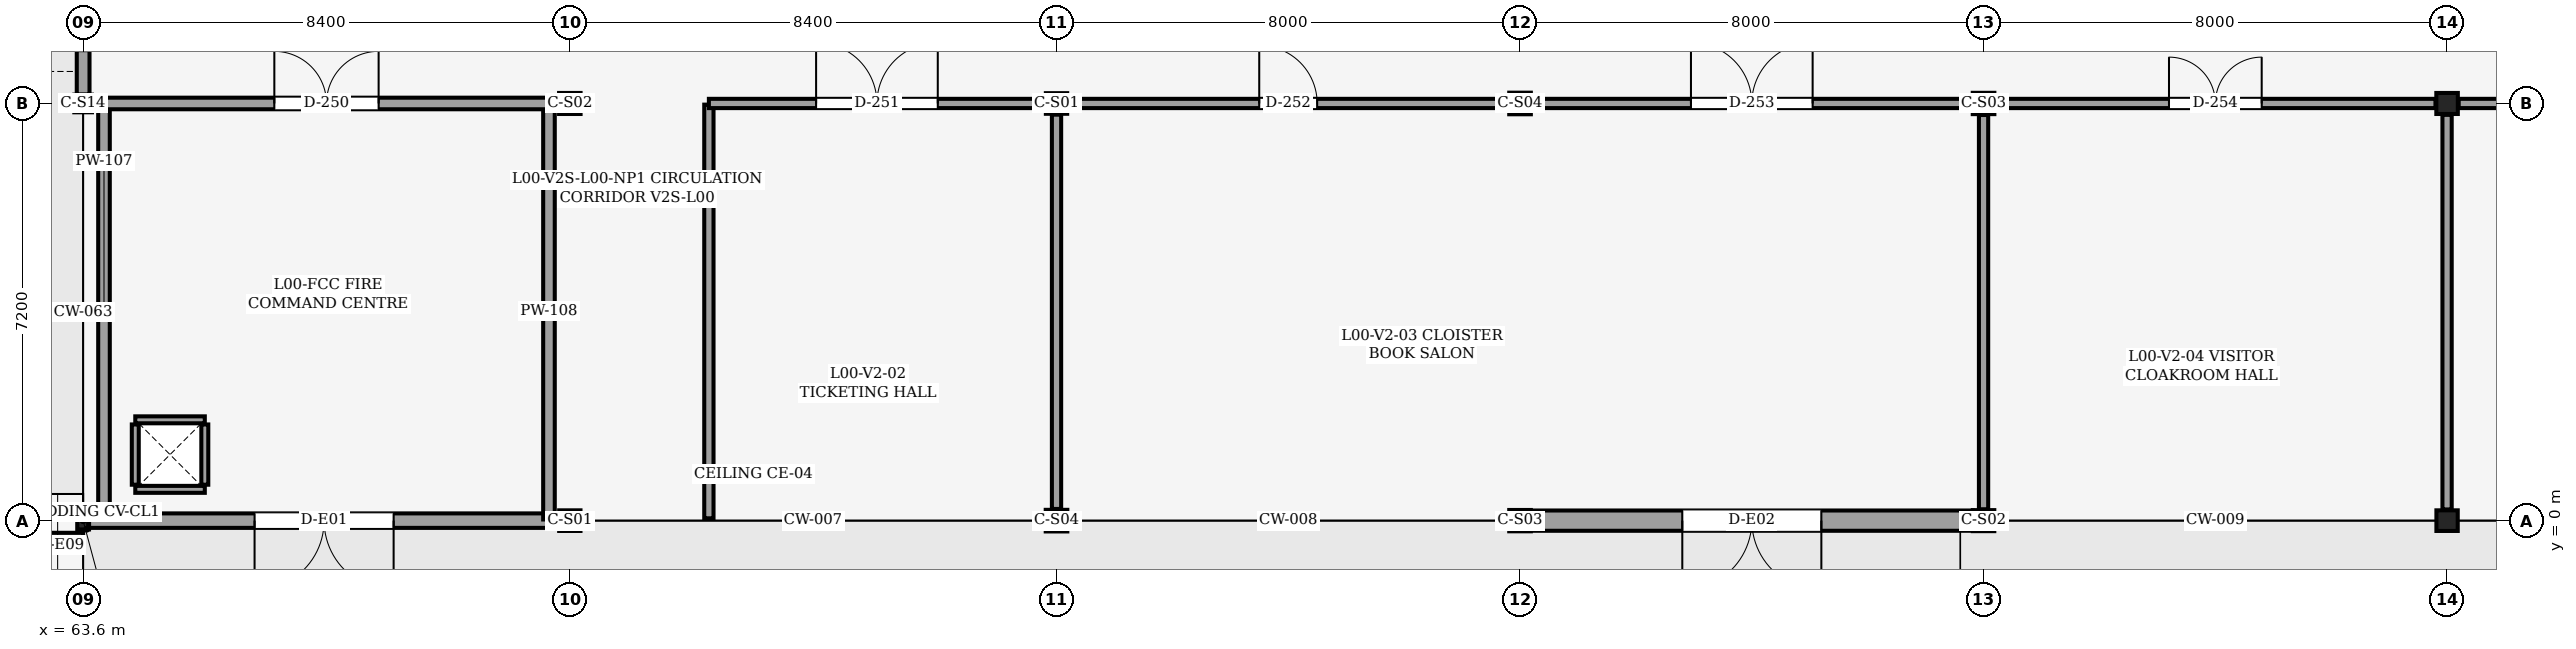
"""IFC4 building model, lengths in metres.
Left out: names, types, materials, properties, quantities, classifications, styles, units other than length and angle.
Written with IfcOpenShell. Run it as: python <this file> out.ifc"""

import sys

from ifc_helpers import new_model, si_unit, direction, frame, frame_2d, origin, origin_2d, place, context, subcontext, project, spatial, rectangle, hollow_rectangle, i_section, extrude, element, fill, save


model = new_model("IFC4")
c1 = context("Model", 3, precision=1e-05, world=origin(), true_north=direction((0.0, 1.0)))
c2 = subcontext(c1, "Body", "Model", "MODEL_VIEW")
j1 = project(units=[si_unit("LENGTHUNIT", "METRE"), si_unit("PLANEANGLEUNIT", "RADIAN")], contexts=[c1])
p1 = place(None, origin())
s1 = spatial("IfcSite", under=j1, at=p1, CompositionType="ELEMENT")
p2 = place(p1, origin())
s2 = spatial("IfcBuilding", under=s1, at=p2, CompositionType="ELEMENT")
p3 = place(p2, origin())
s3 = spatial("IfcBuildingStorey", under=s2, at=p3, CompositionType="ELEMENT", Elevation=0.0)
p4 = place(p3, frame((63.6, 0.0, 0.0), z_axis=(0.0, 0.0, 1.0), x_axis=(1.0, 0.0, 0.0)))
e1 = element("IfcColumn", 1, at=p4, inside=s3, PredefinedType="COLUMN", context=c2, shape_type="SweptSolid", body=[
    extrude(hollow_rectangle(XDim=0.203, YDim=0.305, WallThickness=0.013, OuterFilletRadius=0.025, at=origin_2d()), origin(), (0.0, 0.0, 1.0), 5.4),
])
p5 = place(p3, frame((63.6, 7.2, 0.0), z_axis=(0.0, 0.0, 1.0), x_axis=(1.0, 0.0, 0.0)))
e2 = element("IfcColumn", 2, at=p5, inside=s3, PredefinedType="COLUMN", context=c2, shape_type="SweptSolid", body=[
    extrude(hollow_rectangle(XDim=0.305, YDim=0.305, WallThickness=0.016, OuterFilletRadius=0.032, at=origin_2d()), origin(), (0.0, 0.0, 1.0), 5.4),
])
p6 = place(p3, frame((72.0, 0.0, 0.0), z_axis=(0.0, 0.0, 1.0), x_axis=(1.0, 0.0, 0.0)))
e3 = element("IfcColumn", 3, at=p6, inside=s3, PredefinedType="COLUMN", context=c2, shape_type="SweptSolid", body=[
    extrude(i_section(OverallWidth=0.368, OverallDepth=0.356, WebThickness=0.011, FlangeThickness=0.018, FilletRadius=0.025, at=origin_2d()), origin(), (0.0, 0.0, 1.0), 5.4),
])
p7 = place(p3, frame((72.0, 7.2, 0.0), z_axis=(0.0, 0.0, 1.0), x_axis=(1.0, 0.0, 0.0)))
e4 = element("IfcColumn", 4, at=p7, inside=s3, PredefinedType="COLUMN", context=c2, shape_type="SweptSolid", body=[
    extrude(i_section(OverallWidth=0.371, OverallDepth=0.363, WebThickness=0.013, FlangeThickness=0.022, FilletRadius=0.025, at=origin_2d()), origin(), (0.0, 0.0, 1.0), 5.4),
])
p8 = place(p3, frame((80.4, 0.0, 0.0), z_axis=(0.0, 0.0, 1.0), x_axis=(1.0, 0.0, 0.0)))
e5 = element("IfcColumn", 5, at=p8, inside=s3, PredefinedType="COLUMN", context=c2, shape_type="SweptSolid", body=[
    extrude(i_section(OverallWidth=0.373, OverallDepth=0.373, WebThickness=0.016, FlangeThickness=0.026, FilletRadius=0.025, at=origin_2d()), origin(), (0.0, 0.0, 1.0), 5.4),
])
p9 = place(p3, frame((80.4, 7.2, 0.0), z_axis=(0.0, 0.0, 1.0), x_axis=(1.0, 0.0, 0.0)))
e6 = element("IfcColumn", 6, at=p9, inside=s3, PredefinedType="COLUMN", context=c2, shape_type="SweptSolid", body=[
    extrude(i_section(OverallWidth=0.368, OverallDepth=0.356, WebThickness=0.011, FlangeThickness=0.018, FilletRadius=0.025, at=origin_2d()), origin(), (0.0, 0.0, 1.0), 5.4),
])
p10 = place(p3, frame((88.4, 0.0, 0.0), z_axis=(0.0, 0.0, 1.0), x_axis=(1.0, 0.0, 0.0)))
e7 = element("IfcColumn", 7, at=p10, inside=s3, PredefinedType="COLUMN", context=c2, shape_type="SweptSolid", body=[
    extrude(i_section(OverallWidth=0.373, OverallDepth=0.368, WebThickness=0.015, FlangeThickness=0.024, FilletRadius=0.025, at=origin_2d()), origin(), (0.0, 0.0, 1.0), 5.4),
])
p11 = place(p3, frame((88.4, 7.2, 0.0), z_axis=(0.0, 0.0, 1.0), x_axis=(1.0, 0.0, 0.0)))
e8 = element("IfcColumn", 8, at=p11, inside=s3, PredefinedType="COLUMN", context=c2, shape_type="SweptSolid", body=[
    extrude(i_section(OverallWidth=0.373, OverallDepth=0.373, WebThickness=0.016, FlangeThickness=0.026, FilletRadius=0.025, at=origin_2d()), origin(), (0.0, 0.0, 1.0), 5.4),
])
p12 = place(p3, frame((96.4, 0.0, 0.0), z_axis=(0.0, 0.0, 1.0), x_axis=(1.0, 0.0, 0.0)))
e9 = element("IfcColumn", 9, at=p12, inside=s3, PredefinedType="COLUMN", context=c2, shape_type="SweptSolid", body=[
    extrude(i_section(OverallWidth=0.371, OverallDepth=0.363, WebThickness=0.013, FlangeThickness=0.022, FilletRadius=0.025, at=origin_2d()), origin(), (0.0, 0.0, 1.0), 5.4),
])
p13 = place(p3, frame((96.4, 7.2, 0.0), z_axis=(0.0, 0.0, 1.0), x_axis=(1.0, 0.0, 0.0)))
e10 = element("IfcColumn", 10, at=p13, inside=s3, PredefinedType="COLUMN", context=c2, shape_type="SweptSolid", body=[
    extrude(i_section(OverallWidth=0.373, OverallDepth=0.368, WebThickness=0.015, FlangeThickness=0.024, FilletRadius=0.025, at=origin_2d()), origin(), (0.0, 0.0, 1.0), 5.4),
])
p14 = place(p3, frame((104.4, 0.0, 0.0), z_axis=(0.0, 0.0, 1.0), x_axis=(1.0, 0.0, 0.0)))
e11 = element("IfcColumn", 11, at=p14, inside=s3, PredefinedType="COLUMN", context=c2, shape_type="SweptSolid", body=[
    extrude(i_section(OverallWidth=0.368, OverallDepth=0.356, WebThickness=0.011, FlangeThickness=0.018, FilletRadius=0.025, at=origin_2d()), origin(), (0.0, 0.0, 1.0), 5.4),
])
p15 = place(p3, frame((104.4, 7.2, 0.0), z_axis=(0.0, 0.0, 1.0), x_axis=(1.0, 0.0, 0.0)))
e12 = element("IfcColumn", 12, at=p15, inside=s3, PredefinedType="COLUMN", context=c2, shape_type="SweptSolid", body=[
    extrude(i_section(OverallWidth=0.371, OverallDepth=0.363, WebThickness=0.013, FlangeThickness=0.022, FilletRadius=0.025, at=origin_2d()), origin(), (0.0, 0.0, 1.0), 5.4),
])
p16 = place(p3, frame((71.816, 0.0, 0.0), z_axis=(0.0, 0.0, 1.0), x_axis=(-1.0, 0.0, 0.0)))
e13 = element("IfcWall", 13, at=p16, inside=s3, PredefinedType="SOLIDWALL", context=c2, shape_type="SweptSolid", body=[
    extrude(rectangle(XDim=8.114, YDim=0.25, at=frame_2d((4.057, 0.0))), origin(), (0.0, 0.0, 1.0), 4.528),
])
p17 = place(p16, frame((2.857, 0.0, 0.0)))
e14 = element("IfcOpeningElement", 14, at=p17, cuts=e13, PredefinedType="OPENING", context=c2, shape_type="SweptSolid", body=[
    extrude(rectangle(XDim=2.4, YDim=2.5, at=frame_2d((1.2, 1.25))), frame((0.0, 0.135, 0.0), z_axis=(0.0, -1.0, 0.0), x_axis=(1.0, 0.0, 0.0)), (0.0, 0.0, 1.0), 0.271),
])
p18 = place(p3, frame((96.215, 0.0, 0.0), z_axis=(0.0, 0.0, 1.0), x_axis=(-1.0, 0.0, 0.0)))
e15 = element("IfcWall", 15, at=p18, inside=s3, PredefinedType="SOLIDWALL", context=c2, shape_type="SweptSolid", body=[
    extrude(rectangle(XDim=7.628, YDim=0.35, at=frame_2d((3.814, 0.0))), origin(), (0.0, 0.0, 1.0), 4.591),
])
p19 = place(p18, frame((2.614, 0.0, 0.0)))
e16 = element("IfcOpeningElement", 16, at=p19, cuts=e15, PredefinedType="OPENING", context=c2, shape_type="SweptSolid", body=[
    extrude(rectangle(XDim=2.4, YDim=2.5, at=frame_2d((1.2, 1.25))), frame((0.0, 0.185, 0.0), z_axis=(0.0, -1.0, 0.0), x_axis=(1.0, 0.0, 0.0)), (0.0, 0.0, 1.0), 0.371),
])
p20 = place(p3, frame((63.6, 7.352, 0.0), z_axis=(0.0, 0.0, 1.0), x_axis=(0.0, 1.0, 0.0)))
e17 = element("IfcWall", 17, at=p20, inside=s3, PredefinedType="SOLIDWALL", context=c2, shape_type="SweptSolid", body=[
    extrude(rectangle(XDim=6.946, YDim=0.22, at=frame_2d((3.473, 0.0))), origin(), (0.0, 0.0, 1.0), 4.678),
])
p21 = place(p20, frame((0.75, 0.0, 0.9)))
e18 = element("IfcOpeningElement", 18, at=p21, cuts=e17, PredefinedType="OPENING", context=c2, shape_type="SweptSolid", body=[
    extrude(rectangle(XDim=1.2, YDim=1.5, at=frame_2d((0.6, 0.75))), frame((0.0, 0.12, 0.0), z_axis=(0.0, -1.0, 0.0), x_axis=(1.0, 0.0, 0.0)), (0.0, 0.0, 1.0), 0.24),
])
for number, where, z_axis, x_axis in (
    (19, (64.5, 0.54, 0.0), (0.0, 0.0, 1.0), (1.0, 0.0, 0.0)),
    (20, (64.5, 1.74, 0.0), (0.0, 0.0, 1.0), (1.0, 0.0, 0.0)),
):
    element("IfcWall", number, at=place(p3, frame(where, z_axis=z_axis, x_axis=x_axis)), inside=s3, PredefinedType="PARTITIONING", context=c2, shape_type="SweptSolid", body=[
        extrude(rectangle(XDim=1.2, YDim=0.12, at=frame_2d((0.6, 0.0))), origin(), (0.0, 0.0, 1.0), 5.16),
    ])
for number, where, z_axis, x_axis in (
    (21, (64.5, 0.62, 0.0), (0.0, 0.0, 1.0), (0.0, 1.0, 0.0)),
    (22, (65.7, 0.62, 0.0), (0.0, 0.0, 1.0), (0.0, 1.0, 0.0)),
):
    element("IfcWall", number, at=place(p3, frame(where, z_axis=z_axis, x_axis=x_axis)), inside=s3, PredefinedType="PARTITIONING", context=c2, shape_type="SweptSolid", body=[
        extrude(rectangle(XDim=1.04, YDim=0.12, at=frame_2d((0.52, 0.0))), origin(), (0.0, 0.0, 1.0), 5.16),
    ])
p22 = place(p3, frame((61.84, -0.31, -0.6), z_axis=(0.0, 0.0, 1.0), x_axis=(1.0, 0.0, 0.0)))
e23 = element("IfcWall", 23, at=p22, inside=s3, PredefinedType="PARAPET", context=c2, shape_type="SweptSolid", body=[
    extrude(rectangle(XDim=1.76, YDim=0.2, at=frame_2d((0.88, 0.0))), origin(), (0.0, 0.0, 1.0), 1.45),
])
for number, where, z_axis, x_axis in (
    (24, (63.96, 0.02, 0.0), (0.0, 0.0, 1.0), (0.0, 1.0, 0.0)),
    (25, (71.64, 0.02, 0.0), (0.0, 0.0, 1.0), (0.0, 1.0, 0.0)),
):
    element("IfcWall", number, at=place(p3, frame(where, z_axis=z_axis, x_axis=x_axis)), inside=s3, PredefinedType="PARTITIONING", context=c2, shape_type="SweptSolid", body=[
        extrude(rectangle(XDim=7.18, YDim=0.2, at=frame_2d((3.59, 0.0))), origin(), (0.0, 0.0, 1.0), 5.14),
    ])
p23 = place(p3, frame((63.96, 7.2, 0.0), z_axis=(0.0, 0.0, 1.0), x_axis=(1.0, 0.0, 0.0)))
e26 = element("IfcWall", 26, at=p23, inside=s3, PredefinedType="PARTITIONING", context=c2, shape_type="SweptSolid", body=[
    extrude(rectangle(XDim=7.68, YDim=0.2, at=frame_2d((3.84, 0.0))), origin(), (0.0, 0.0, 1.0), 4.378),
])
p24 = place(p23, frame((2.94, 0.0, 0.0)))
e27 = element("IfcOpeningElement", 27, at=p24, cuts=e26, PredefinedType="OPENING", context=c2, shape_type="SweptSolid", body=[
    extrude(rectangle(XDim=1.8, YDim=2.4, at=frame_2d((0.9, 1.2))), frame((0.0, 0.11, 0.0), z_axis=(0.0, -1.0, 0.0), x_axis=(1.0, 0.0, 0.0)), (0.0, 0.0, 1.0), 0.22),
])
p25 = place(p3, frame((74.4, 0.04, 0.0), z_axis=(0.0, 0.0, 1.0), x_axis=(0.0, 1.0, 0.0)))
e28 = element("IfcWall", 28, at=p25, inside=s3, PredefinedType="PARTITIONING", context=c2, shape_type="SweptSolid", body=[
    extrude(rectangle(XDim=7.14, YDim=0.16, at=frame_2d((3.57, 0.0))), origin(), (0.0, 0.0, 1.0), 5.14),
])
p26 = place(p3, frame((74.4, 7.2, 0.0), z_axis=(0.0, 0.0, 1.0), x_axis=(1.0, 0.0, 0.0)))
e29 = element("IfcWall", 29, at=p26, inside=s3, PredefinedType="PARTITIONING", context=c2, shape_type="SweptSolid", body=[
    extrude(rectangle(XDim=5.801, YDim=0.16, at=frame_2d((2.9, 0.0))), origin(), (0.0, 0.0, 1.0), 4.447),
])
p27 = place(p26, frame((1.851, 0.0, 0.0)))
e30 = element("IfcOpeningElement", 30, at=p27, cuts=e29, PredefinedType="OPENING", context=c2, shape_type="SweptSolid", body=[
    extrude(rectangle(XDim=2.1, YDim=2.5, at=frame_2d((1.05, 1.25))), frame((0.0, 0.09, 0.0), z_axis=(0.0, -1.0, 0.0), x_axis=(1.0, 0.0, 0.0)), (0.0, 0.0, 1.0), 0.18),
])
p28 = place(p3, frame((80.4, 0.201, 0.0), z_axis=(0.0, 0.0, 1.0), x_axis=(0.0, 1.0, 0.0)))
e31 = element("IfcWall", 31, at=p28, inside=s3, PredefinedType="PARTITIONING", context=c2, shape_type="SweptSolid", body=[
    extrude(rectangle(XDim=6.806, YDim=0.16, at=frame_2d((3.403, 0.0))), origin(), (0.0, 0.0, 1.0), 4.528),
])
p29 = place(p3, frame((80.599, 7.2, 0.0), z_axis=(0.0, 0.0, 1.0), x_axis=(1.0, 0.0, 0.0)))
e32 = element("IfcWall", 32, at=p29, inside=s3, PredefinedType="PARTITIONING", context=c2, shape_type="SweptSolid", body=[
    extrude(rectangle(XDim=7.599, YDim=0.16, at=frame_2d((3.8, 0.0))), origin(), (0.0, 0.0, 1.0), 4.591),
])
p30 = place(p29, frame((3.3, 0.0, 0.0)))
e33 = element("IfcOpeningElement", 33, at=p30, cuts=e32, PredefinedType="OPENING", context=c2, shape_type="SweptSolid", body=[
    extrude(rectangle(XDim=1.0, YDim=2.15, at=frame_2d((0.5, 1.075))), frame((0.0, 0.09, 0.0), z_axis=(0.0, -1.0, 0.0), x_axis=(1.0, 0.0, 0.0)), (0.0, 0.0, 1.0), 0.18),
])
p31 = place(p3, frame((88.602, 7.2, 0.0), z_axis=(0.0, 0.0, 1.0), x_axis=(1.0, 0.0, 0.0)))
e34 = element("IfcWall", 34, at=p31, inside=s3, PredefinedType="PARTITIONING", context=c2, shape_type="SweptSolid", body=[
    extrude(rectangle(XDim=7.597, YDim=0.16, at=frame_2d((3.798, 0.0))), origin(), (0.0, 0.0, 1.0), 4.607),
])
p32 = place(p31, frame((2.749, 0.0, 0.0)))
e35 = element("IfcOpeningElement", 35, at=p32, cuts=e34, PredefinedType="OPENING", context=c2, shape_type="SweptSolid", body=[
    extrude(rectangle(XDim=2.1, YDim=2.5, at=frame_2d((1.05, 1.25))), frame((0.0, 0.09, 0.0), z_axis=(0.0, -1.0, 0.0), x_axis=(1.0, 0.0, 0.0)), (0.0, 0.0, 1.0), 0.18),
])
p33 = place(p3, frame((96.4, 0.197, 0.0), z_axis=(0.0, 0.0, 1.0), x_axis=(0.0, 1.0, 0.0)))
e36 = element("IfcWall", 36, at=p33, inside=s3, PredefinedType="PARTITIONING", context=c2, shape_type="SweptSolid", body=[
    extrude(rectangle(XDim=6.804, YDim=0.16, at=frame_2d((3.402, 0.0))), origin(), (0.0, 0.0, 1.0), 4.607),
])
p34 = place(p3, frame((96.602, 7.2, 0.0), z_axis=(0.0, 0.0, 1.0), x_axis=(1.0, 0.0, 0.0)))
e37 = element("IfcWall", 37, at=p34, inside=s3, PredefinedType="PARTITIONING", context=c2, shape_type="SweptSolid", body=[
    extrude(rectangle(XDim=7.598, YDim=0.16, at=frame_2d((3.799, 0.0))), origin(), (0.0, 0.0, 1.0), 4.678),
])
p35 = place(p34, frame((2.999, 0.0, 0.0)))
e38 = element("IfcOpeningElement", 38, at=p35, cuts=e37, PredefinedType="OPENING", context=c2, shape_type="SweptSolid", body=[
    extrude(rectangle(XDim=1.6, YDim=2.35, at=frame_2d((0.8, 1.175))), frame((0.0, 0.09, 0.0), z_axis=(0.0, -1.0, 0.0), x_axis=(1.0, 0.0, 0.0)), (0.0, 0.0, 1.0), 0.18),
])
p36 = place(p3, frame((104.4, 0.193, 0.0), z_axis=(0.0, 0.0, 1.0), x_axis=(0.0, 1.0, 0.0)))
e39 = element("IfcWall", 39, at=p36, inside=s3, PredefinedType="PARTITIONING", context=c2, shape_type="SweptSolid", body=[
    extrude(rectangle(XDim=6.81, YDim=0.16, at=frame_2d((3.405, 0.0))), origin(), (0.0, 0.0, 1.0), 4.678),
])
p37 = place(p3, frame((104.601, 7.2, 0.0), z_axis=(0.0, 0.0, 1.0), x_axis=(1.0, 0.0, 0.0)))
e40 = element("IfcWall", 40, at=p37, inside=s3, PredefinedType="PARTITIONING", context=c2, shape_type="SweptSolid", body=[
    extrude(rectangle(XDim=8.0, YDim=0.16, at=frame_2d((4.0, 0.0))), origin(), (0.0, 0.0, 1.0), 4.447),
])
p38 = place(p37, frame((3.4, 0.0, 0.0)))
e41 = element("IfcOpeningElement", 41, at=p38, cuts=e40, PredefinedType="OPENING", context=c2, shape_type="SweptSolid", body=[
    extrude(rectangle(XDim=1.2, YDim=2.2, at=frame_2d((0.6, 1.1))), frame((0.0, 0.09, 0.0), z_axis=(0.0, -1.0, 0.0), x_axis=(1.0, 0.0, 0.0)), (0.0, 0.0, 1.0), 0.18),
])
p39 = place(p17, origin())
e42 = element("IfcDoor", 42, at=p39, inside=s3, OperationType="DOUBLE_DOOR_SINGLE_SWING", PredefinedType="DOOR", context=c2, shape_type="SweptSolid", body=[
    extrude(rectangle(XDim=2.4, YDim=2.5, at=frame_2d((1.2, 1.25))), frame((0.0, 0.025, 0.0), z_axis=(0.0, -1.0, 0.0), x_axis=(1.0, 0.0, 0.0)), (0.0, 0.0, 1.0), 0.05),
])
fill(e14, e42)
p40 = place(p19, origin())
e43 = element("IfcDoor", 43, at=p40, inside=s3, OperationType="DOUBLE_DOOR_SINGLE_SWING", PredefinedType="DOOR", context=c2, shape_type="SweptSolid", body=[
    extrude(rectangle(XDim=2.4, YDim=2.5, at=frame_2d((1.2, 1.25))), frame((0.0, 0.025, 0.0), z_axis=(0.0, -1.0, 0.0), x_axis=(1.0, 0.0, 0.0)), (0.0, 0.0, 1.0), 0.05),
])
fill(e16, e43)
p41 = place(p24, origin())
e44 = element("IfcDoor", 44, at=p41, inside=s3, OperationType="DOUBLE_DOOR_SINGLE_SWING", PredefinedType="DOOR", context=c2, shape_type="SweptSolid", body=[
    extrude(rectangle(XDim=1.8, YDim=2.4, at=frame_2d((0.9, 1.2))), frame((0.0, 0.025, 0.0), z_axis=(0.0, -1.0, 0.0), x_axis=(1.0, 0.0, 0.0)), (0.0, 0.0, 1.0), 0.05),
])
fill(e27, e44)
p42 = place(p27, origin())
e45 = element("IfcDoor", 45, at=p42, inside=s3, OperationType="DOUBLE_DOOR_SINGLE_SWING", PredefinedType="DOOR", context=c2, shape_type="SweptSolid", body=[
    extrude(rectangle(XDim=2.1, YDim=2.5, at=frame_2d((1.05, 1.25))), frame((0.0, 0.025, 0.0), z_axis=(0.0, -1.0, 0.0), x_axis=(1.0, 0.0, 0.0)), (0.0, 0.0, 1.0), 0.05),
])
fill(e30, e45)
p43 = place(p30, origin())
e46 = element("IfcDoor", 46, at=p43, inside=s3, OperationType="SINGLE_SWING_LEFT", PredefinedType="DOOR", context=c2, shape_type="SweptSolid", body=[
    extrude(rectangle(XDim=1.0, YDim=2.15, at=frame_2d((0.5, 1.075))), frame((0.0, 0.025, 0.0), z_axis=(0.0, -1.0, 0.0), x_axis=(1.0, 0.0, 0.0)), (0.0, 0.0, 1.0), 0.05),
])
fill(e33, e46)
p44 = place(p32, origin())
e47 = element("IfcDoor", 47, at=p44, inside=s3, OperationType="DOUBLE_DOOR_SINGLE_SWING", PredefinedType="DOOR", context=c2, shape_type="SweptSolid", body=[
    extrude(rectangle(XDim=2.1, YDim=2.5, at=frame_2d((1.05, 1.25))), frame((0.0, 0.025, 0.0), z_axis=(0.0, -1.0, 0.0), x_axis=(1.0, 0.0, 0.0)), (0.0, 0.0, 1.0), 0.05),
])
fill(e35, e47)
p45 = place(p35, origin())
e48 = element("IfcDoor", 48, at=p45, inside=s3, OperationType="DOUBLE_DOOR_SINGLE_SWING", PredefinedType="DOOR", context=c2, shape_type="SweptSolid", body=[
    extrude(rectangle(XDim=1.6, YDim=2.35, at=frame_2d((0.8, 1.175))), frame((0.0, 0.025, 0.0), z_axis=(0.0, -1.0, 0.0), x_axis=(1.0, 0.0, 0.0)), (0.0, 0.0, 1.0), 0.05),
])
fill(e38, e48)
save(model, sys.argv[1])
